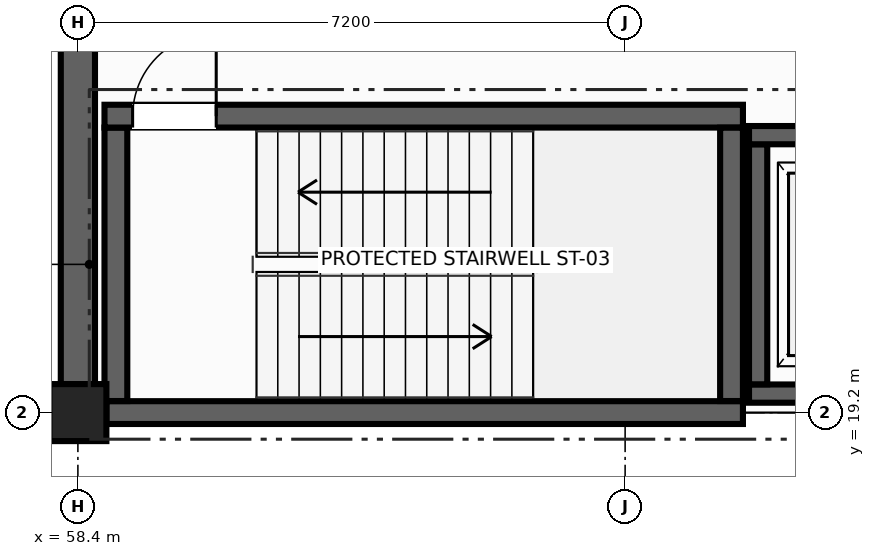
"""IFC4 building model, lengths in metres.
Left out: names, types, materials, properties, quantities, classifications, styles, units other than length and angle.
Written with IfcOpenShell. Run it as: python <this file> out.ifc"""

import sys

from ifc_helpers import new_model, si_unit, direction, frame, frame_2d, origin, origin_2d, place, context, subcontext, project, spatial, rectangle, extrude, element, fill, save


model = new_model("IFC4")
c1 = context("Model", 3, precision=1e-05, world=origin(), true_north=direction((0.0, 1.0)))
c2 = subcontext(c1, "Body", "Model", "MODEL_VIEW")
j1 = project(units=[si_unit("LENGTHUNIT", "METRE"), si_unit("PLANEANGLEUNIT", "RADIAN")], contexts=[c1])
p1 = place(None, origin())
s1 = spatial("IfcSite", under=j1, at=p1, CompositionType="ELEMENT")
p2 = place(p1, origin())
s2 = spatial("IfcBuilding", under=s1, at=p2, CompositionType="ELEMENT")
p3 = place(p2, frame((0.0, 0.0, -4.8)))
s3 = spatial("IfcBuildingStorey", under=s2, at=p3, CompositionType="ELEMENT", Elevation=-4.8)
p4 = place(p3, frame((58.4, 19.2, 0.0), z_axis=(0.0, 0.0, 1.0), x_axis=(0.0, 1.0, 0.0)))
e1 = element("IfcColumn", 1, at=p4, inside=s3, PredefinedType="COLUMN", context=c2, shape_type="SweptSolid", body=[
    extrude(rectangle(XDim=0.75, YDim=0.75, at=origin_2d()), origin(), (0.0, 0.0, 1.0), 4.8),
])
p5 = place(p3, frame((58.4, 19.575, 0.0), z_axis=(0.0, 0.0, 1.0), x_axis=(0.0, 1.0, 0.0)))
e2 = element("IfcWall", 2, at=p5, inside=s3, PredefinedType="SHEAR", context=c2, shape_type="SweptSolid", body=[
    extrude(rectangle(XDim=6.45, YDim=0.45, at=frame_2d((3.225, 0.0))), origin(), (0.0, 0.0, 1.0), 4.48),
])
p6 = place(p3, frame((67.15, 19.2, 0.0), z_axis=(0.0, 0.0, 1.0), x_axis=(-1.0, 0.0, 0.0)))
e3 = element("IfcWall", 3, at=p6, inside=s3, PredefinedType="SHEAR", context=c2, shape_type="SweptSolid", body=[
    extrude(rectangle(XDim=8.375, YDim=0.3, at=frame_2d((4.188, 0.0))), origin(), (0.0, 0.0, 1.0), 4.48),
])
p7 = place(p3, frame((58.9, 19.352, 0.0), z_axis=(0.0, 0.0, 1.0), x_axis=(0.0, 1.0, 0.0)))
e4 = element("IfcWall", 4, at=p7, inside=s3, PredefinedType="SHEAR", context=c2, shape_type="SweptSolid", body=[
    extrude(rectangle(XDim=3.598, YDim=0.3, at=frame_2d((1.799, 0.0))), origin(), (0.0, 0.0, 1.0), 4.48),
])
p8 = place(p3, frame((58.75, 23.1, 0.0), z_axis=(0.0, 0.0, 1.0), x_axis=(1.0, 0.0, 0.0)))
e5 = element("IfcWall", 5, at=p8, inside=s3, PredefinedType="SHEAR", context=c2, shape_type="SweptSolid", body=[
    extrude(rectangle(XDim=8.4, YDim=0.3, at=frame_2d((4.2, 0.0))), origin(), (0.0, 0.0, 1.0), 4.48),
])
p9 = place(p8, frame((0.37, 0.0, 0.0)))
e6 = element("IfcOpeningElement", 6, at=p9, cuts=e5, PredefinedType="OPENING", context=c2, shape_type="SweptSolid", body=[
    extrude(rectangle(XDim=1.1, YDim=2.15, at=frame_2d((0.55, 1.075))), frame((0.0, 0.16, 0.0), z_axis=(0.0, -1.0, 0.0), x_axis=(1.0, 0.0, 0.0)), (0.0, 0.0, 1.0), 0.32),
])
p10 = place(p3, frame((67.0, 22.948, 0.0), z_axis=(0.0, 0.0, 1.0), x_axis=(0.0, -1.0, 0.0)))
e7 = element("IfcWall", 7, at=p10, inside=s3, PredefinedType="SHEAR", context=c2, shape_type="SweptSolid", body=[
    extrude(rectangle(XDim=3.596, YDim=0.3, at=frame_2d((1.798, 0.0))), origin(), (0.0, 0.0, 1.0), 4.48),
])
p11 = place(p3, frame((70.07, 19.45, 0.0), z_axis=(0.0, 0.0, 1.0), x_axis=(-1.0, 0.0, 0.0)))
e8 = element("IfcWall", 8, at=p11, inside=s3, PredefinedType="SHEAR", context=c2, shape_type="SweptSolid", body=[
    extrude(rectangle(XDim=2.84, YDim=0.24, at=frame_2d((1.42, 0.0))), origin(), (0.0, 0.0, 1.0), 4.48),
])
p12 = place(p3, frame((67.35, 19.572, 0.0), z_axis=(0.0, 0.0, 1.0), x_axis=(0.0, 1.0, 0.0)))
e9 = element("IfcWall", 9, at=p12, inside=s3, PredefinedType="SHEAR", context=c2, shape_type="SweptSolid", body=[
    extrude(rectangle(XDim=3.158, YDim=0.24, at=frame_2d((1.579, 0.0))), origin(), (0.0, 0.0, 1.0), 4.48),
])
p13 = place(p3, frame((67.23, 22.85, 0.0), z_axis=(0.0, 0.0, 1.0), x_axis=(1.0, 0.0, 0.0)))
e10 = element("IfcWall", 10, at=p13, inside=s3, PredefinedType="SHEAR", context=c2, shape_type="SweptSolid", body=[
    extrude(rectangle(XDim=2.84, YDim=0.24, at=frame_2d((1.42, 0.0))), origin(), (0.0, 0.0, 1.0), 4.48),
])
p14 = place(p13, frame((0.82, 0.0, 0.0)))
e11 = element("IfcOpeningElement", 11, at=p14, cuts=e10, PredefinedType="OPENING", context=c2, shape_type="SweptSolid", body=[
    extrude(rectangle(XDim=1.2, YDim=2.15, at=frame_2d((0.6, 1.075))), frame((0.0, 0.13, 0.0), z_axis=(0.0, -1.0, 0.0), x_axis=(1.0, 0.0, 0.0)), (0.0, 0.0, 1.0), 0.26),
])
p15 = place(p9, origin())
e12 = element("IfcDoor", 12, at=p15, inside=s3, OperationType="SINGLE_SWING_RIGHT", PredefinedType="DOOR", context=c2, shape_type="SweptSolid", body=[
    extrude(rectangle(XDim=1.1, YDim=2.15, at=frame_2d((0.55, 1.075))), frame((0.0, 0.025, 0.0), z_axis=(0.0, -1.0, 0.0), x_axis=(1.0, 0.0, 0.0)), (0.0, 0.0, 1.0), 0.05),
])
fill(e6, e12)
save(model, sys.argv[1])
